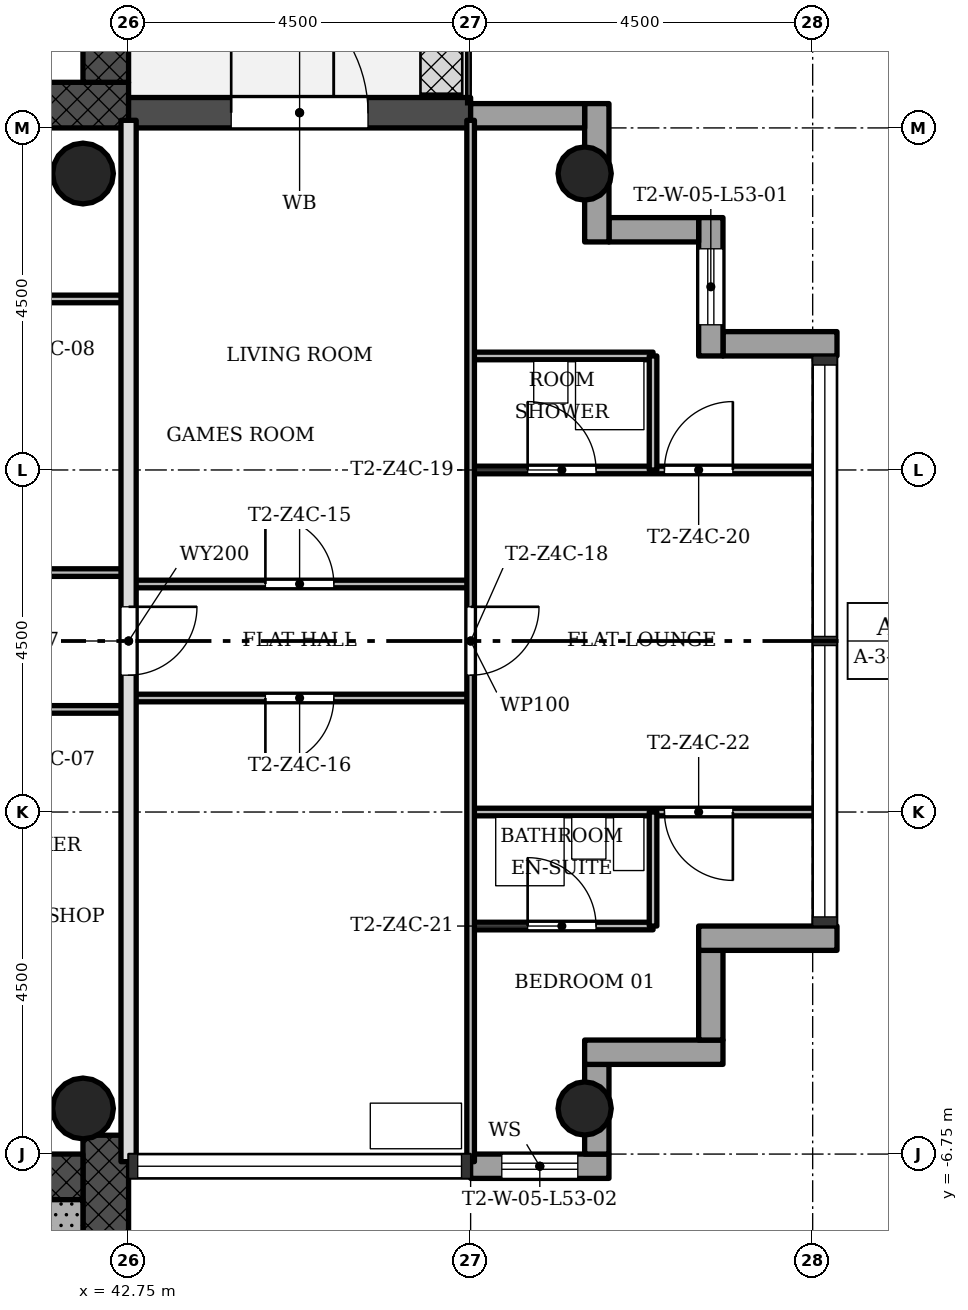
"""IFC4 building model, lengths in metres.
Left out: names, types, materials, properties, quantities, classifications, styles, units other than length and angle.
Written with IfcOpenShell. Run it as: python <this file> out.ifc"""

import sys

from ifc_helpers import new_model, si_unit, direction, frame, frame_2d, origin, origin_2d, place, context, subcontext, project, spatial, rectangle, hollow_circle, extrude, element, fill, save


model = new_model("IFC4")
c1 = context("Model", 3, precision=1e-05, world=origin(), true_north=direction((0.0, 1.0)))
c2 = subcontext(c1, "Body", "Model", "MODEL_VIEW")
j1 = project(units=[si_unit("LENGTHUNIT", "METRE"), si_unit("PLANEANGLEUNIT", "RADIAN")], contexts=[c1])
p1 = place(None, origin())
s1 = spatial("IfcSite", under=j1, at=p1, CompositionType="ELEMENT")
p2 = place(p1, origin())
s2 = spatial("IfcBuilding", under=s1, at=p2, CompositionType="ELEMENT")
p3 = place(p2, frame((0.0, 0.0, 192.6)))
s3 = spatial("IfcBuildingStorey", under=s2, at=p3, CompositionType="ELEMENT", Elevation=192.6)
p4 = place(p3, frame((29.85, 7.05, 0.0), z_axis=(0.0, 0.0, 1.0), x_axis=(1.0, 0.0, 0.0)))
e1 = element("IfcWall", 1, at=p4, inside=s3, PredefinedType="SHEAR", context=c2, shape_type="SweptSolid", body=[
    extrude(rectangle(XDim=12.9, YDim=0.6, at=frame_2d((6.45, 0.0))), origin(), (0.0, 0.0, 1.0), 3.4),
])
p5 = place(p4, frame((5.25, 0.0, 0.0)))
e2 = element("IfcOpeningElement", 2, at=p5, cuts=e1, PredefinedType="OPENING", context=c2, shape_type="SweptSolid", body=[
    extrude(rectangle(XDim=1.8, YDim=2.1, at=frame_2d((0.9, 1.05))), frame((0.0, 0.31, 0.0), z_axis=(0.0, -1.0, 0.0), x_axis=(1.0, 0.0, 0.0)), (0.0, 0.0, 1.0), 0.62),
])
p6 = place(p3, frame((42.45, 7.35, 0.0), z_axis=(0.0, 0.0, 1.0), x_axis=(0.0, 1.0, 0.0)))
e3 = element("IfcWall", 3, at=p6, inside=s3, PredefinedType="SHEAR", context=c2, shape_type="SweptSolid", body=[
    extrude(rectangle(XDim=8.4, YDim=0.6, at=frame_2d((4.2, 0.0))), origin(), (0.0, 0.0, 1.0), 3.4),
])
p7 = place(p3, frame((42.45, -15.15, 0.0), z_axis=(0.0, 0.0, 1.0), x_axis=(0.0, 1.0, 0.0)))
e4 = element("IfcWall", 4, at=p7, inside=s3, PredefinedType="SHEAR", context=c2, shape_type="SweptSolid", body=[
    extrude(rectangle(XDim=8.648, YDim=0.6, at=frame_2d((4.324, 0.0))), origin(), (0.0, 0.0, 1.0), 3.4),
])
p8 = place(p3, frame((42.15, -7.05, 0.0), z_axis=(0.0, 0.0, 1.0), x_axis=(-1.0, 0.0, 0.0)))
e5 = element("IfcWall", 5, at=p8, inside=s3, PredefinedType="SHEAR", context=c2, shape_type="SweptSolid", body=[
    extrude(rectangle(XDim=12.9, YDim=0.6, at=frame_2d((6.45, 0.0))), origin(), (0.0, 0.0, 1.0), 3.4),
])
p9 = place(p8, frame((5.25, 0.0, 0.0)))
e6 = element("IfcOpeningElement", 6, at=p9, cuts=e5, PredefinedType="OPENING", context=c2, shape_type="SweptSolid", body=[
    extrude(rectangle(XDim=1.8, YDim=2.1, at=frame_2d((0.9, 1.05))), frame((0.0, 0.31, 0.0), z_axis=(0.0, -1.0, 0.0), x_axis=(1.0, 0.0, 0.0)), (0.0, 0.0, 1.0), 0.62),
])
for number, where, z_axis, x_axis in (
    (7, (48.75, -6.15, 0.0), (0.0, 0.0, 1.0), (1.0, 0.0, 0.0)),
    (8, (48.75, 6.15, 0.0), (0.0, 0.0, 1.0), (1.0, 0.0, 0.0)),
):
    element("IfcColumn", number, at=place(p3, frame(where, z_axis=z_axis, x_axis=x_axis)), inside=s3, PredefinedType="COLUMN", context=c2, shape_type="SweptSolid", body=[
        extrude(hollow_circle(Radius=0.35, WallThickness=0.025, at=origin_2d()), origin(), (0.0, 0.0, 1.0), 3.4),
    ])
for number, where, z_axis, x_axis in (
    (9, (42.15, -6.15, 0.0), (0.0, 0.0, 1.0), (1.0, 0.0, 0.0)),
    (10, (42.15, 6.15, 0.0), (0.0, 0.0, 1.0), (1.0, 0.0, 0.0)),
):
    element("IfcColumn", number, at=place(p3, frame(where, z_axis=z_axis, x_axis=x_axis)), inside=s3, PredefinedType="COLUMN", context=c2, shape_type="SweptSolid", body=[
        extrude(hollow_circle(Radius=0.4, WallThickness=0.028, at=origin_2d()), origin(), (0.0, 0.0, 1.0), 3.4),
    ])
p10 = place(p3, frame((47.25, -6.91, -0.3), z_axis=(0.0, 0.0, 1.0), x_axis=(1.0, 0.0, 0.0)))
e11 = element("IfcWall", 11, at=p10, inside=s3, PredefinedType="STANDARD", context=c2, shape_type="SweptSolid", body=[
    extrude(rectangle(XDim=1.82, YDim=0.32, at=frame_2d((0.91, 0.0))), origin(), (0.0, 0.0, 1.0), 3.4),
])
p11 = place(p10, frame((0.41, 0.0, 1.2)))
e12 = element("IfcOpeningElement", 12, at=p11, cuts=e11, PredefinedType="OPENING", context=c2, shape_type="SweptSolid", body=[
    extrude(rectangle(XDim=1.0, YDim=1.5, at=frame_2d((0.5, 0.75))), frame((0.0, 0.17, 0.0), z_axis=(0.0, -1.0, 0.0), x_axis=(1.0, 0.0, 0.0)), (0.0, 0.0, 1.0), 0.34),
])
p12 = place(p3, frame((48.91, -6.75, -0.3), z_axis=(0.0, 0.0, 1.0), x_axis=(0.0, 1.0, 0.0)))
e13 = element("IfcWall", 13, at=p12, inside=s3, PredefinedType="STANDARD", context=c2, shape_type="SweptSolid", body=[
    extrude(rectangle(XDim=1.18, YDim=0.32, at=frame_2d((0.59, 0.0))), origin(), (0.0, 0.0, 1.0), 3.4),
])
p13 = place(p3, frame((48.75, -5.41, -0.3), z_axis=(0.0, 0.0, 1.0), x_axis=(1.0, 0.0, 0.0)))
e14 = element("IfcWall", 14, at=p13, inside=s3, PredefinedType="STANDARD", context=c2, shape_type="SweptSolid", body=[
    extrude(rectangle(XDim=1.82, YDim=0.32, at=frame_2d((0.91, 0.0))), origin(), (0.0, 0.0, 1.0), 3.4),
])
p14 = place(p3, frame((50.41, -5.25, -0.3), z_axis=(0.0, 0.0, 1.0), x_axis=(0.0, 1.0, 0.0)))
e15 = element("IfcWall", 15, at=p14, inside=s3, PredefinedType="STANDARD", context=c2, shape_type="SweptSolid", body=[
    extrude(rectangle(XDim=1.18, YDim=0.32, at=frame_2d((0.59, 0.0))), origin(), (0.0, 0.0, 1.0), 3.4),
])
p15 = place(p3, frame((50.25, -3.91, -0.3), z_axis=(0.0, 0.0, 1.0), x_axis=(1.0, 0.0, 0.0)))
e16 = element("IfcWall", 16, at=p15, inside=s3, PredefinedType="STANDARD", context=c2, shape_type="SweptSolid", body=[
    extrude(rectangle(XDim=1.82, YDim=0.32, at=frame_2d((0.91, 0.0))), origin(), (0.0, 0.0, 1.0), 3.4),
])
p16 = place(p3, frame((52.07, 3.91, -0.3), z_axis=(0.0, 0.0, 1.0), x_axis=(-1.0, 0.0, 0.0)))
e17 = element("IfcWall", 17, at=p16, inside=s3, PredefinedType="STANDARD", context=c2, shape_type="SweptSolid", body=[
    extrude(rectangle(XDim=1.5, YDim=0.32, at=frame_2d((0.75, 0.0))), origin(), (0.0, 0.0, 1.0), 3.4),
])
p17 = place(p3, frame((50.41, 3.75, -0.3), z_axis=(0.0, 0.0, 1.0), x_axis=(0.0, 1.0, 0.0)))
e18 = element("IfcWall", 18, at=p17, inside=s3, PredefinedType="STANDARD", context=c2, shape_type="SweptSolid", body=[
    extrude(rectangle(XDim=1.82, YDim=0.32, at=frame_2d((0.91, 0.0))), origin(), (0.0, 0.0, 1.0), 3.4),
])
p18 = place(p17, frame((0.41, 0.0, 1.2)))
e19 = element("IfcOpeningElement", 19, at=p18, cuts=e18, PredefinedType="OPENING", context=c2, shape_type="SweptSolid", body=[
    extrude(rectangle(XDim=1.0, YDim=1.5, at=frame_2d((0.5, 0.75))), frame((0.0, 0.17, 0.0), z_axis=(0.0, -1.0, 0.0), x_axis=(1.0, 0.0, 0.0)), (0.0, 0.0, 1.0), 0.34),
])
p19 = place(p3, frame((50.25, 5.41, -0.3), z_axis=(0.0, 0.0, 1.0), x_axis=(-1.0, 0.0, 0.0)))
e20 = element("IfcWall", 20, at=p19, inside=s3, PredefinedType="STANDARD", context=c2, shape_type="SweptSolid", body=[
    extrude(rectangle(XDim=1.18, YDim=0.32, at=frame_2d((0.59, 0.0))), origin(), (0.0, 0.0, 1.0), 3.4),
])
p20 = place(p3, frame((48.91, 5.25, -0.3), z_axis=(0.0, 0.0, 1.0), x_axis=(0.0, 1.0, 0.0)))
e21 = element("IfcWall", 21, at=p20, inside=s3, PredefinedType="STANDARD", context=c2, shape_type="SweptSolid", body=[
    extrude(rectangle(XDim=1.82, YDim=0.32, at=frame_2d((0.91, 0.0))), origin(), (0.0, 0.0, 1.0), 3.4),
])
p21 = place(p3, frame((48.75, 6.91, -0.3), z_axis=(0.0, 0.0, 1.0), x_axis=(-1.0, 0.0, 0.0)))
e22 = element("IfcWall", 22, at=p21, inside=s3, PredefinedType="STANDARD", context=c2, shape_type="SweptSolid", body=[
    extrude(rectangle(XDim=1.5, YDim=0.32, at=frame_2d((0.75, 0.0))), origin(), (0.0, 0.0, 1.0), 3.4),
])
p22 = place(p3, frame((47.25, 6.95, -0.02), z_axis=(0.0, 0.0, 1.0), x_axis=(-1.0, 0.0, 0.0)))
e23 = element("IfcWall", 23, at=p22, inside=s3, PredefinedType="STANDARD", context=c2, shape_type="SweptSolid", body=[
    extrude(rectangle(XDim=4.5, YDim=0.4, at=frame_2d((2.25, 0.0))), origin(), (0.0, 0.0, 1.0), 3.12),
])
p23 = place(p22, frame((1.35, 0.0, 0.02)))
e24 = element("IfcOpeningElement", 24, at=p23, cuts=e23, PredefinedType="OPENING", context=c2, shape_type="SweptSolid", body=[
    extrude(rectangle(XDim=1.8, YDim=2.1, at=frame_2d((0.9, 1.05))), frame((0.0, 0.21, 0.0), z_axis=(0.0, -1.0, 0.0), x_axis=(1.0, 0.0, 0.0)), (0.0, 0.0, 1.0), 0.42),
])
p24 = place(p3, frame((49.65, -3.75, 0.0), z_axis=(0.0, 0.0, 1.0), x_axis=(-1.0, 0.0, 0.0)))
e25 = element("IfcWall", 25, at=p24, inside=s3, PredefinedType="PARTITIONING", context=c2, shape_type="SweptSolid", body=[
    extrude(rectangle(XDim=2.4, YDim=0.1, at=frame_2d((1.2, 0.0))), origin(), (0.0, 0.0, 1.0), 3.0),
])
p25 = place(p24, frame((0.75, 0.0, 0.0)))
e26 = element("IfcOpeningElement", 26, at=p25, cuts=e25, PredefinedType="OPENING", context=c2, shape_type="SweptSolid", body=[
    extrude(rectangle(XDim=0.9, YDim=2.1, at=frame_2d((0.45, 1.05))), frame((0.0, 0.06, 0.0), z_axis=(0.0, -1.0, 0.0), x_axis=(1.0, 0.0, 0.0)), (0.0, 0.0, 1.0), 0.12),
])
p26 = place(p3, frame((51.85, -2.25, 0.0), z_axis=(0.0, 0.0, 1.0), x_axis=(-1.0, 0.0, 0.0)))
e27 = element("IfcWall", 27, at=p26, inside=s3, PredefinedType="PARTITIONING", context=c2, shape_type="SweptSolid", body=[
    extrude(rectangle(XDim=4.6, YDim=0.1, at=frame_2d((2.3, 0.0))), origin(), (0.0, 0.0, 1.0), 3.0),
])
p27 = place(p26, frame((1.15, 0.0, 0.0)))
e28 = element("IfcOpeningElement", 28, at=p27, cuts=e27, PredefinedType="OPENING", context=c2, shape_type="SweptSolid", body=[
    extrude(rectangle(XDim=0.9, YDim=2.1, at=frame_2d((0.45, 1.05))), frame((0.0, 0.06, 0.0), z_axis=(0.0, -1.0, 0.0), x_axis=(1.0, 0.0, 0.0)), (0.0, 0.0, 1.0), 0.12),
])
p28 = place(p3, frame((42.75, -0.9, 0.0), z_axis=(0.0, 0.0, 1.0), x_axis=(-1.0, 0.0, 0.0)))
e29 = element("IfcWall", 29, at=p28, inside=s3, PredefinedType="PARTITIONING", context=c2, shape_type="SweptSolid", body=[
    extrude(rectangle(XDim=2.25, YDim=0.1, at=frame_2d((1.125, 0.0))), origin(), (0.0, 0.0, 1.0), 3.0),
])
p29 = place(p3, frame((47.25, -0.75, 0.0), z_axis=(0.0, 0.0, 1.0), x_axis=(-1.0, 0.0, 0.0)))
e30 = element("IfcWall", 30, at=p29, inside=s3, PredefinedType="PARTITIONING", context=c2, shape_type="SweptSolid", body=[
    extrude(rectangle(XDim=4.5, YDim=0.1, at=frame_2d((2.25, 0.0))), origin(), (0.0, 0.0, 1.0), 3.0),
])
p30 = place(p29, frame((1.8, 0.0, 0.0)))
e31 = element("IfcOpeningElement", 31, at=p30, cuts=e30, PredefinedType="OPENING", context=c2, shape_type="SweptSolid", body=[
    extrude(rectangle(XDim=0.9, YDim=2.1, at=frame_2d((0.45, 1.05))), frame((0.0, 0.06, 0.0), z_axis=(0.0, -1.0, 0.0), x_axis=(1.0, 0.0, 0.0)), (0.0, 0.0, 1.0), 0.12),
])
p31 = place(p3, frame((47.25, 0.75, 0.0), z_axis=(0.0, 0.0, 1.0), x_axis=(-1.0, 0.0, 0.0)))
e32 = element("IfcWall", 32, at=p31, inside=s3, PredefinedType="PARTITIONING", context=c2, shape_type="SweptSolid", body=[
    extrude(rectangle(XDim=4.5, YDim=0.1, at=frame_2d((2.25, 0.0))), origin(), (0.0, 0.0, 1.0), 3.0),
])
p32 = place(p31, frame((1.8, 0.0, 0.0)))
e33 = element("IfcOpeningElement", 33, at=p32, cuts=e32, PredefinedType="OPENING", context=c2, shape_type="SweptSolid", body=[
    extrude(rectangle(XDim=0.9, YDim=2.1, at=frame_2d((0.45, 1.05))), frame((0.0, 0.06, 0.0), z_axis=(0.0, -1.0, 0.0), x_axis=(1.0, 0.0, 0.0)), (0.0, 0.0, 1.0), 0.12),
])
p33 = place(p3, frame((42.75, 0.9, 0.0), z_axis=(0.0, 0.0, 1.0), x_axis=(-1.0, 0.0, 0.0)))
e34 = element("IfcWall", 34, at=p33, inside=s3, PredefinedType="PARTITIONING", context=c2, shape_type="SweptSolid", body=[
    extrude(rectangle(XDim=2.25, YDim=0.1, at=frame_2d((1.125, 0.0))), origin(), (0.0, 0.0, 1.0), 3.0),
])
p34 = place(p3, frame((51.85, 2.25, 0.0), z_axis=(0.0, 0.0, 1.0), x_axis=(-1.0, 0.0, 0.0)))
e35 = element("IfcWall", 35, at=p34, inside=s3, PredefinedType="PARTITIONING", context=c2, shape_type="SweptSolid", body=[
    extrude(rectangle(XDim=4.6, YDim=0.1, at=frame_2d((2.3, 0.0))), origin(), (0.0, 0.0, 1.0), 3.0),
])
p35 = place(p34, frame((2.95, 0.0, 0.0)))
e36 = element("IfcOpeningElement", 36, at=p35, cuts=e35, PredefinedType="OPENING", context=c2, shape_type="SweptSolid", body=[
    extrude(rectangle(XDim=0.9, YDim=2.1, at=frame_2d((0.45, 1.05))), frame((0.0, 0.06, 0.0), z_axis=(0.0, -1.0, 0.0), x_axis=(1.0, 0.0, 0.0)), (0.0, 0.0, 1.0), 0.12),
])
p36 = place(p34, frame((1.15, 0.0, 0.0)))
e37 = element("IfcOpeningElement", 37, at=p36, cuts=e35, PredefinedType="OPENING", context=c2, shape_type="SweptSolid", body=[
    extrude(rectangle(XDim=0.9, YDim=2.1, at=frame_2d((0.45, 1.05))), frame((0.0, 0.06, 0.0), z_axis=(0.0, -1.0, 0.0), x_axis=(1.0, 0.0, 0.0)), (0.0, 0.0, 1.0), 0.12),
])
p37 = place(p3, frame((49.65, 3.75, 0.0), z_axis=(0.0, 0.0, 1.0), x_axis=(-1.0, 0.0, 0.0)))
e38 = element("IfcWall", 38, at=p37, inside=s3, PredefinedType="PARTITIONING", context=c2, shape_type="SweptSolid", body=[
    extrude(rectangle(XDim=2.4, YDim=0.1, at=frame_2d((1.2, 0.0))), origin(), (0.0, 0.0, 1.0), 3.0),
])
p38 = place(p3, frame((42.75, 4.5, 0.0), z_axis=(0.0, 0.0, 1.0), x_axis=(-1.0, 0.0, 0.0)))
e39 = element("IfcWall", 39, at=p38, inside=s3, PredefinedType="PARTITIONING", context=c2, shape_type="SweptSolid", body=[
    extrude(rectangle(XDim=5.25, YDim=0.1, at=frame_2d((2.625, 0.0))), origin(), (0.0, 0.0, 1.0), 3.0),
])
p39 = place(p38, frame((3.3, 0.0, 0.0)))
e40 = element("IfcOpeningElement", 40, at=p39, cuts=e39, PredefinedType="OPENING", context=c2, shape_type="SweptSolid", body=[
    extrude(rectangle(XDim=0.9, YDim=2.1, at=frame_2d((0.45, 1.05))), frame((0.0, 0.06, 0.0), z_axis=(0.0, -1.0, 0.0), x_axis=(1.0, 0.0, 0.0)), (0.0, 0.0, 1.0), 0.12),
])
for number, where, z_axis, x_axis in (
    (41, (49.65, -3.75, 0.0), (0.0, 0.0, 1.0), (0.0, 1.0, 0.0)),
    (42, (49.65, 2.25, 0.0), (0.0, 0.0, 1.0), (0.0, 1.0, 0.0)),
):
    element("IfcWall", number, at=place(p3, frame(where, z_axis=z_axis, x_axis=x_axis)), inside=s3, PredefinedType="PARTITIONING", context=c2, shape_type="SweptSolid", body=[
        extrude(rectangle(XDim=1.5, YDim=0.1, at=frame_2d((0.75, 0.0))), origin(), (0.0, 0.0, 1.0), 3.0),
    ])
p40 = place(p3, frame((47.25, -6.85, 0.0), z_axis=(0.0, 0.0, 1.0), x_axis=(0.0, 1.0, 0.0)))
e43 = element("IfcWall", 43, at=p40, inside=s3, PredefinedType="PARTITIONING", context=c2, shape_type="SweptSolid", body=[
    extrude(rectangle(XDim=13.7, YDim=0.1, at=frame_2d((6.85, 0.0))), origin(), (0.0, 0.0, 1.0), 3.0),
])
p41 = place(p40, frame((6.4, 0.0, 0.0)))
e44 = element("IfcOpeningElement", 44, at=p41, cuts=e43, PredefinedType="OPENING", context=c2, shape_type="SweptSolid", body=[
    extrude(rectangle(XDim=0.9, YDim=2.1, at=frame_2d((0.45, 1.05))), frame((0.0, 0.06, 0.0), z_axis=(0.0, -1.0, 0.0), x_axis=(1.0, 0.0, 0.0)), (0.0, 0.0, 1.0), 0.12),
])
p42 = place(p3, frame((42.75, -6.85, 0.0), z_axis=(0.0, 0.0, 1.0), x_axis=(0.0, 1.0, 0.0)))
e45 = element("IfcWall", 45, at=p42, inside=s3, PredefinedType="SOLIDWALL", context=c2, shape_type="SweptSolid", body=[
    extrude(rectangle(XDim=13.7, YDim=0.2, at=frame_2d((6.85, 0.0))), origin(), (0.0, 0.0, 1.0), 3.0),
])
p43 = place(p42, frame((6.4, 0.0, 0.0)))
e46 = element("IfcOpeningElement", 46, at=p43, cuts=e45, PredefinedType="OPENING", context=c2, shape_type="SweptSolid", body=[
    extrude(rectangle(XDim=0.9, YDim=2.1, at=frame_2d((0.45, 1.05))), frame((0.0, 0.11, 0.0), z_axis=(0.0, -1.0, 0.0), x_axis=(1.0, 0.0, 0.0)), (0.0, 0.0, 1.0), 0.22),
])
p44 = place(p3, frame((37.85, -7.65, 0.0), z_axis=(0.0, 0.0, 1.0), x_axis=(1.0, 0.0, 0.0)))
e47 = element("IfcWall", 47, at=p44, inside=s3, PredefinedType="SHEAR", context=c2, shape_type="SweptSolid", body=[
    extrude(rectangle(XDim=4.3, YDim=0.6, at=frame_2d((2.15, 0.0))), origin(), (0.0, 0.0, 1.0), 3.4),
])
p45 = place(p23, origin())
e48 = element("IfcDoor", 48, at=p45, inside=s3, OperationType="SINGLE_SWING_RIGHT", PredefinedType="DOOR", context=c2, shape_type="SweptSolid", body=[
    extrude(rectangle(XDim=1.8, YDim=2.1, at=frame_2d((0.9, 1.05))), frame((0.0, 0.025, 0.0), z_axis=(0.0, -1.0, 0.0), x_axis=(1.0, 0.0, 0.0)), (0.0, 0.0, 1.0), 0.05),
])
fill(e24, e48)
p46 = place(p32, origin())
e49 = element("IfcDoor", 49, at=p46, inside=s3, OperationType="SINGLE_SWING_RIGHT", PredefinedType="DOOR", context=c2, shape_type="SweptSolid", body=[
    extrude(rectangle(XDim=0.9, YDim=2.1, at=frame_2d((0.45, 1.05))), frame((0.0, 0.025, 0.0), z_axis=(0.0, -1.0, 0.0), x_axis=(1.0, 0.0, 0.0)), (0.0, 0.0, 1.0), 0.05),
])
fill(e33, e49)
p47 = place(p30, origin())
e50 = element("IfcDoor", 50, at=p47, inside=s3, OperationType="SINGLE_SWING_LEFT", PredefinedType="DOOR", context=c2, shape_type="SweptSolid", body=[
    extrude(rectangle(XDim=0.9, YDim=2.1, at=frame_2d((0.45, 1.05))), frame((0.0, 0.025, 0.0), z_axis=(0.0, -1.0, 0.0), x_axis=(1.0, 0.0, 0.0)), (0.0, 0.0, 1.0), 0.05),
])
fill(e31, e50)
p48 = place(p43, origin())
e51 = element("IfcDoor", 51, at=p48, inside=s3, OperationType="SINGLE_SWING_RIGHT", PredefinedType="DOOR", context=c2, shape_type="SweptSolid", body=[
    extrude(rectangle(XDim=0.9, YDim=2.1, at=frame_2d((0.45, 1.05))), frame((0.0, 0.025, 0.0), z_axis=(0.0, -1.0, 0.0), x_axis=(1.0, 0.0, 0.0)), (0.0, 0.0, 1.0), 0.05),
])
fill(e46, e51)
p49 = place(p41, origin())
e52 = element("IfcDoor", 52, at=p49, inside=s3, OperationType="SINGLE_SWING_RIGHT", PredefinedType="DOOR", context=c2, shape_type="SweptSolid", body=[
    extrude(rectangle(XDim=0.9, YDim=2.1, at=frame_2d((0.45, 1.05))), frame((0.0, 0.025, 0.0), z_axis=(0.0, -1.0, 0.0), x_axis=(1.0, 0.0, 0.0)), (0.0, 0.0, 1.0), 0.05),
])
fill(e44, e52)
p50 = place(p35, origin())
e53 = element("IfcDoor", 53, at=p50, inside=s3, OperationType="SINGLE_SWING_RIGHT", PredefinedType="DOOR", context=c2, shape_type="SweptSolid", body=[
    extrude(rectangle(XDim=0.9, YDim=2.1, at=frame_2d((0.45, 1.05))), frame((0.0, 0.025, 0.0), z_axis=(0.0, -1.0, 0.0), x_axis=(1.0, 0.0, 0.0)), (0.0, 0.0, 1.0), 0.05),
])
fill(e36, e53)
p51 = place(p36, origin())
e54 = element("IfcDoor", 54, at=p51, inside=s3, OperationType="SINGLE_SWING_LEFT", PredefinedType="DOOR", context=c2, shape_type="SweptSolid", body=[
    extrude(rectangle(XDim=0.9, YDim=2.1, at=frame_2d((0.45, 1.05))), frame((0.0, 0.025, 0.0), z_axis=(0.0, -1.0, 0.0), x_axis=(1.0, 0.0, 0.0)), (0.0, 0.0, 1.0), 0.05),
])
fill(e37, e54)
p52 = place(p25, origin())
e55 = element("IfcDoor", 55, at=p52, inside=s3, OperationType="SINGLE_SWING_RIGHT", PredefinedType="DOOR", context=c2, shape_type="SweptSolid", body=[
    extrude(rectangle(XDim=0.9, YDim=2.1, at=frame_2d((0.45, 1.05))), frame((0.0, 0.025, 0.0), z_axis=(0.0, -1.0, 0.0), x_axis=(1.0, 0.0, 0.0)), (0.0, 0.0, 1.0), 0.05),
])
fill(e26, e55)
p53 = place(p27, origin())
e56 = element("IfcDoor", 56, at=p53, inside=s3, OperationType="SINGLE_SWING_RIGHT", PredefinedType="DOOR", context=c2, shape_type="SweptSolid", body=[
    extrude(rectangle(XDim=0.9, YDim=2.1, at=frame_2d((0.45, 1.05))), frame((0.0, 0.025, 0.0), z_axis=(0.0, -1.0, 0.0), x_axis=(1.0, 0.0, 0.0)), (0.0, 0.0, 1.0), 0.05),
])
fill(e28, e56)
p54 = place(p18, origin())
e57 = element("IfcWindow", 57, at=p54, inside=s3, PartitioningType="SINGLE_PANEL", PredefinedType="WINDOW", context=c2, shape_type="SweptSolid", body=[
    extrude(rectangle(XDim=1.0, YDim=1.5, at=frame_2d((0.5, 0.75))), frame((0.0, 0.03, 0.0), z_axis=(0.0, -1.0, 0.0), x_axis=(1.0, 0.0, 0.0)), (0.0, 0.0, 1.0), 0.06),
])
fill(e19, e57)
p55 = place(p11, origin())
e58 = element("IfcWindow", 58, at=p55, inside=s3, PartitioningType="SINGLE_PANEL", PredefinedType="WINDOW", context=c2, shape_type="SweptSolid", body=[
    extrude(rectangle(XDim=1.0, YDim=1.5, at=frame_2d((0.5, 0.75))), frame((0.0, 0.03, 0.0), z_axis=(0.0, -1.0, 0.0), x_axis=(1.0, 0.0, 0.0)), (0.0, 0.0, 1.0), 0.06),
])
fill(e12, e58)
save(model, sys.argv[1])
